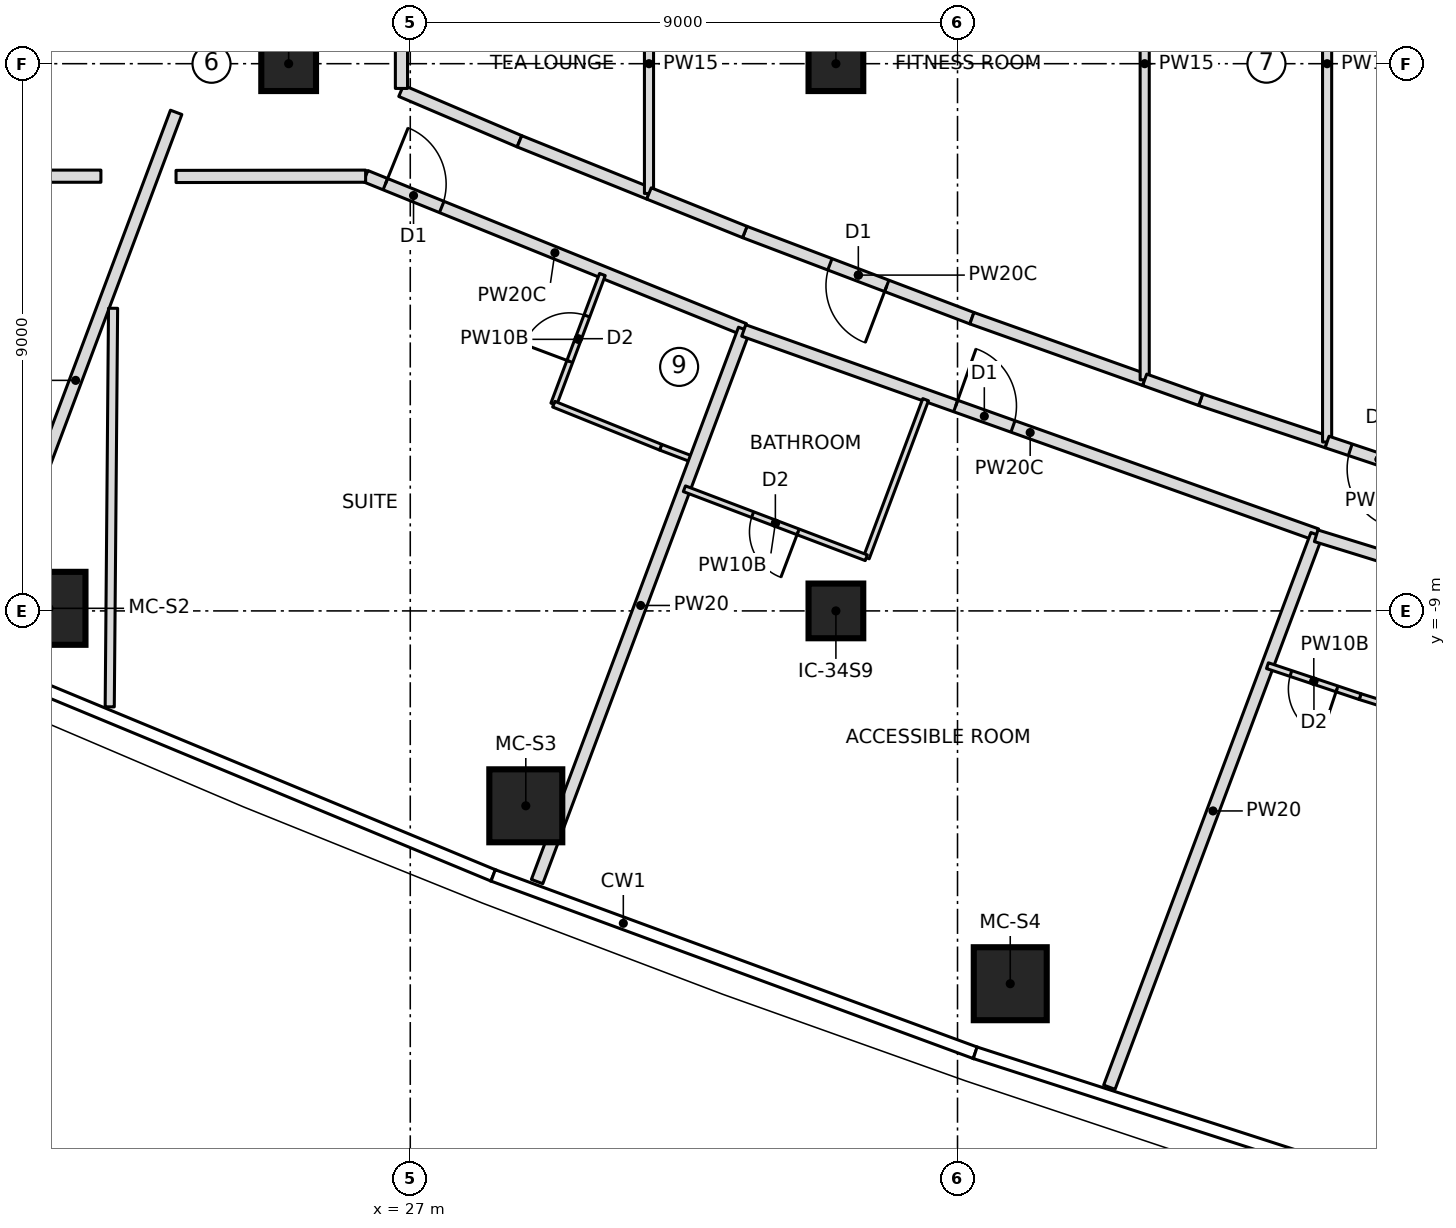
"""IFC4 building model, lengths in metres.
Left out: names, types, materials, properties, quantities, classifications, styles, units other than length and angle.
Written with IfcOpenShell. Run it as: python <this file> out.ifc"""

import sys

from ifc_helpers import new_model, si_unit, direction, frame, frame_2d, origin, origin_2d, place, context, subcontext, project, spatial, rectangle, extrude, element, fill, save


model = new_model("IFC4")
c1 = context("Model", 3, precision=1e-05, world=origin(), true_north=direction((0.0, 1.0)))
c2 = subcontext(c1, "Body", "Model", "MODEL_VIEW")
j1 = project(units=[si_unit("LENGTHUNIT", "METRE"), si_unit("PLANEANGLEUNIT", "RADIAN")], contexts=[c1])
p1 = place(None, origin())
s1 = spatial("IfcSite", under=j1, at=p1, CompositionType="ELEMENT")
p2 = place(p1, origin())
s2 = spatial("IfcBuilding", under=s1, at=p2, CompositionType="ELEMENT")
p3 = place(p2, frame((0.0, 0.0, 231.45)))
s3 = spatial("IfcBuildingStorey", under=s2, at=p3, CompositionType="ELEMENT", Elevation=231.45)
for number, where, z_axis, x_axis in (
    (1, (21.059, -8.958, 0.0), (0.0, 0.0, 1.0), (1.0, 0.0, 0.0)),
    (2, (28.9, -12.205, 0.0), (0.0, 0.0, 1.0), (1.0, 0.0, 0.0)),
    (3, (36.867, -15.132, 0.0), (0.0, 0.0, 1.0), (1.0, 0.0, 0.0)),
):
    element("IfcColumn", number, at=place(p3, frame(where, z_axis=z_axis, x_axis=x_axis)), inside=s3, PredefinedType="COLUMN", context=c2, shape_type="SweptSolid", body=[
        extrude(rectangle(XDim=1.2, YDim=1.2, at=origin_2d()), origin(), (0.0, 0.0, 1.0), 3.55),
    ])
for number, where, z_axis, x_axis in (
    (4, (25.0, 0.0, 0.0), (0.0, 0.0, 1.0), (1.0, 0.0, 0.0)),
    (5, (34.0, -9.0, 0.0), (0.0, 0.0, 1.0), (1.0, 0.0, 0.0)),
    (6, (34.0, 0.0, 0.0), (0.0, 0.0, 1.0), (1.0, 0.0, 0.0)),
):
    element("IfcColumn", number, at=place(p3, frame(where, z_axis=z_axis, x_axis=x_axis)), inside=s3, PredefinedType="COLUMN", context=c2, shape_type="SweptSolid", body=[
        extrude(rectangle(XDim=0.9, YDim=0.9, at=origin_2d()), origin(), (0.0, 0.0, 1.0), 3.55),
    ])
p4 = place(p3, frame((13.052, -1.85, 0.0), z_axis=(0.0, 0.0, 1.0), x_axis=(1.0, 0.0, 0.0)))
e7 = element("IfcWall", 7, at=p4, inside=s3, PredefinedType="PARTITIONING", context=c2, shape_type="SweptSolid", body=[
    extrude(rectangle(XDim=8.861, YDim=0.2, at=frame_2d((4.43, 0.0))), origin(), (0.0, 0.0, 1.0), 3.25),
])
p5 = place(p4, frame((3.93, 0.0, 0.0)))
e8 = element("IfcOpeningElement", 8, at=p5, cuts=e7, PredefinedType="OPENING", context=c2, shape_type="SweptSolid", body=[
    extrude(rectangle(XDim=1.0, YDim=2.1, at=frame_2d((0.5, 1.05))), frame((0.0, 0.11, 0.0), z_axis=(0.0, -1.0, 0.0), x_axis=(1.0, 0.0, 0.0)), (0.0, 0.0, 1.0), 0.22),
])
p6 = place(p3, frame((19.844, -9.616, 0.0), z_axis=(0.0, 0.0, 1.0), x_axis=(0.351123441588, 0.936329177569, 0.0)))
e9 = element("IfcWall", 9, at=p6, inside=s3, PredefinedType="PARTITIONING", context=c2, shape_type="SweptSolid", body=[
    extrude(rectangle(XDim=9.416, YDim=0.2, at=frame_2d((4.708, 0.0))), origin(), (0.0, 0.0, 1.0), 3.25),
])
p7 = place(p3, frame((26.266, -1.85, 0.0), z_axis=(0.0, 0.0, 1.0), x_axis=(0.927007906702, -0.375041785555, 0.0)))
e10 = element("IfcWall", 10, at=p7, inside=s3, PredefinedType="PARTITIONING", context=c2, shape_type="SweptSolid", body=[
    extrude(rectangle(XDim=6.716, YDim=0.2, at=frame_2d((3.358, 0.0))), origin(), (0.0, 0.0, 1.0), 3.25),
])
p8 = place(p7, frame((0.35, 0.0, 0.0)))
e11 = element("IfcOpeningElement", 11, at=p8, cuts=e10, PredefinedType="OPENING", context=c2, shape_type="SweptSolid", body=[
    extrude(rectangle(XDim=1.0, YDim=2.1, at=frame_2d((0.5, 1.05))), frame((0.0, 0.11, 0.0), z_axis=(0.0, -1.0, 0.0), x_axis=(1.0, 0.0, 0.0)), (0.0, 0.0, 1.0), 0.22),
])
p9 = place(p3, frame((29.36, -5.6, 0.0), z_axis=(0.0, 0.0, 1.0), x_axis=(0.351158682313, 0.936315961541, 0.0)))
e12 = element("IfcWall", 12, at=p9, inside=s3, PredefinedType="PARTITIONING", context=c2, shape_type="SweptSolid", body=[
    extrude(rectangle(XDim=2.278, YDim=0.1, at=frame_2d((1.139, 0.0))), origin(), (0.0, 0.0, 1.0), 3.25),
])
p10 = place(p9, frame((0.75, 0.0, 0.0)))
e13 = element("IfcOpeningElement", 13, at=p10, cuts=e12, PredefinedType="OPENING", context=c2, shape_type="SweptSolid", body=[
    extrude(rectangle(XDim=0.8, YDim=2.1, at=frame_2d((0.4, 1.05))), frame((0.0, 0.06, 0.0), z_axis=(0.0, -1.0, 0.0), x_axis=(1.0, 0.0, 0.0)), (0.0, 0.0, 1.0), 0.12),
])
p11 = place(p3, frame((31.684, -6.522, 0.0), z_axis=(0.0, 0.0, 1.0), x_axis=(-0.935048188903, 0.354520640342, 0.0)))
e14 = element("IfcWall", 14, at=p11, inside=s3, PredefinedType="PARTITIONING", context=c2, shape_type="SweptSolid", body=[
    extrude(rectangle(XDim=0.606, YDim=0.1, at=frame_2d((0.303, 0.0))), origin(), (0.0, 0.0, 1.0), 3.25),
])
p12 = place(p3, frame((31.117, -6.308, 0.0), z_axis=(0.0, 0.0, 1.0), x_axis=(-0.927594225674, 0.373589283166, 0.0)))
e15 = element("IfcWall", 15, at=p12, inside=s3, PredefinedType="PARTITIONING", context=c2, shape_type="SweptSolid", body=[
    extrude(rectangle(XDim=1.895, YDim=0.1, at=frame_2d((0.947, 0.0))), origin(), (0.0, 0.0, 1.0), 3.25),
])
p13 = place(p3, frame((29.086, -13.451, 0.0), z_axis=(0.0, 0.0, 1.0), x_axis=(0.351128958016, 0.93632710889, 0.0)))
e16 = element("IfcWall", 16, at=p13, inside=s3, PredefinedType="PARTITIONING", context=c2, shape_type="SweptSolid", body=[
    extrude(rectangle(XDim=9.7, YDim=0.2, at=frame_2d((4.85, 0.0))), origin(), (0.0, 0.0, 1.0), 3.25),
])
p14 = place(p3, frame((32.485, -4.388, 0.0), z_axis=(0.0, 0.0, 1.0), x_axis=(0.941953797829, -0.335742524498, 0.0)))
e17 = element("IfcWall", 17, at=p14, inside=s3, PredefinedType="PARTITIONING", context=c2, shape_type="SweptSolid", body=[
    extrude(rectangle(XDim=10.001, YDim=0.2, at=frame_2d((5.001, 0.0))), origin(), (0.0, 0.0, 1.0), 3.25),
])
p15 = place(p14, frame((3.7, 0.0, 0.0)))
e18 = element("IfcOpeningElement", 18, at=p15, cuts=e17, PredefinedType="OPENING", context=c2, shape_type="SweptSolid", body=[
    extrude(rectangle(XDim=1.0, YDim=2.1, at=frame_2d((0.5, 1.05))), frame((0.0, 0.11, 0.0), z_axis=(0.0, -1.0, 0.0), x_axis=(1.0, 0.0, 0.0)), (0.0, 0.0, 1.0), 0.22),
])
p16 = place(p3, frame((35.475, -5.526, 0.0), z_axis=(0.0, 0.0, 1.0), x_axis=(-0.351065630332, -0.936350854755, 0.0)))
e19 = element("IfcWall", 19, at=p16, inside=s3, PredefinedType="PARTITIONING", context=c2, shape_type="SweptSolid", body=[
    extrude(rectangle(XDim=2.777, YDim=0.1, at=frame_2d((1.388, 0.0))), origin(), (0.0, 0.0, 1.0), 3.25),
])
p17 = place(p3, frame((34.5, -8.126, 0.0), z_axis=(0.0, 0.0, 1.0), x_axis=(-0.934948661714, 0.354783032232, 0.0)))
e20 = element("IfcWall", 20, at=p17, inside=s3, PredefinedType="PARTITIONING", context=c2, shape_type="SweptSolid", body=[
    extrude(rectangle(XDim=3.2, YDim=0.1, at=frame_2d((1.6, 0.0))), origin(), (0.0, 0.0, 1.0), 3.25),
])
p18 = place(p17, frame((1.2, 0.0, 0.0)))
e21 = element("IfcOpeningElement", 21, at=p18, cuts=e20, PredefinedType="OPENING", context=c2, shape_type="SweptSolid", body=[
    extrude(rectangle(XDim=0.8, YDim=2.1, at=frame_2d((0.4, 1.05))), frame((0.0, 0.06, 0.0), z_axis=(0.0, -1.0, 0.0), x_axis=(1.0, 0.0, 0.0)), (0.0, 0.0, 1.0), 0.12),
])
p19 = place(p3, frame((38.497, -16.834, 0.0), z_axis=(0.0, 0.0, 1.0), x_axis=(0.35112895446, 0.936327110224, 0.0)))
e22 = element("IfcWall", 22, at=p19, inside=s3, PredefinedType="PARTITIONING", context=c2, shape_type="SweptSolid", body=[
    extrude(rectangle(XDim=9.706, YDim=0.2, at=frame_2d((4.853, 0.0))), origin(), (0.0, 0.0, 1.0), 3.25),
])
p20 = place(p3, frame((43.128, -10.568, 0.0), z_axis=(0.0, 0.0, 1.0), x_axis=(-0.954618903587, 0.297830067176, 0.0)))
e23 = element("IfcWall", 23, at=p20, inside=s3, PredefinedType="PARTITIONING", context=c2, shape_type="SweptSolid", body=[
    extrude(rectangle(XDim=0.531, YDim=0.1, at=frame_2d((0.266, 0.0))), origin(), (0.0, 0.0, 1.0), 3.25),
])
p21 = place(p3, frame((42.621, -10.409, 0.0), z_axis=(0.0, 0.0, 1.0), x_axis=(-0.948485479965, 0.3168206027, 0.0)))
e24 = element("IfcWall", 24, at=p21, inside=s3, PredefinedType="PARTITIONING", context=c2, shape_type="SweptSolid", body=[
    extrude(rectangle(XDim=1.606, YDim=0.1, at=frame_2d((0.803, 0.0))), origin(), (0.0, 0.0, 1.0), 3.25),
])
p22 = place(p21, frame((0.4, 0.0, 0.0)))
e25 = element("IfcOpeningElement", 25, at=p22, cuts=e24, PredefinedType="OPENING", context=c2, shape_type="SweptSolid", body=[
    extrude(rectangle(XDim=0.8, YDim=2.1, at=frame_2d((0.4, 1.05))), frame((0.0, 0.06, 0.0), z_axis=(0.0, -1.0, 0.0), x_axis=(1.0, 0.0, 0.0)), (0.0, 0.0, 1.0), 0.12),
])
p23 = place(p3, frame((28.796, -1.276, 0.0), z_axis=(0.0, 0.0, 1.0), x_axis=(-0.91990756443, 0.392135273732, 0.0)))
e26 = element("IfcWall", 26, at=p23, inside=s3, PredefinedType="PARTITIONING", context=c2, shape_type="SweptSolid", body=[
    extrude(rectangle(XDim=2.115, YDim=0.2, at=frame_2d((1.058, 0.0))), origin(), (0.0, 0.0, 1.0), 3.25),
])
p24 = place(p3, frame((30.926, -2.134, 0.0), z_axis=(0.0, 0.0, 1.0), x_axis=(-0.927609077038, 0.373552406224, 0.0)))
e27 = element("IfcWall", 27, at=p24, inside=s3, PredefinedType="PARTITIONING", context=c2, shape_type="SweptSolid", body=[
    extrude(rectangle(XDim=2.297, YDim=0.2, at=frame_2d((1.148, 0.0))), origin(), (0.0, 0.0, 1.0), 3.25),
])
p25 = place(p3, frame((30.926, -2.134, 0.0), z_axis=(0.0, 0.0, 1.0), x_axis=(0.0, 1.0, 0.0)))
e28 = element("IfcWall", 28, at=p25, inside=s3, PredefinedType="PARTITIONING", context=c2, shape_type="SweptSolid", body=[
    extrude(rectangle(XDim=4.268, YDim=0.15, at=frame_2d((2.134, 0.0))), origin(), (0.0, 0.0, 1.0), 3.25),
])
p26 = place(p3, frame((36.236, -4.186, 0.0), z_axis=(0.0, 0.0, 1.0), x_axis=(-0.934950696546, 0.354777669856, 0.0)))
e29 = element("IfcWall", 29, at=p26, inside=s3, PredefinedType="PARTITIONING", context=c2, shape_type="SweptSolid", body=[
    extrude(rectangle(XDim=3.995, YDim=0.2, at=frame_2d((1.997, 0.0))), origin(), (0.0, 0.0, 1.0), 3.25),
])
p27 = place(p26, frame((1.498, 0.0, 0.0)))
e30 = element("IfcOpeningElement", 30, at=p27, cuts=e29, PredefinedType="OPENING", context=c2, shape_type="SweptSolid", body=[
    extrude(rectangle(XDim=1.0, YDim=2.1, at=frame_2d((0.5, 1.05))), frame((0.0, 0.11, 0.0), z_axis=(0.0, -1.0, 0.0), x_axis=(1.0, 0.0, 0.0)), (0.0, 0.0, 1.0), 0.22),
])
p28 = place(p3, frame((39.078, -5.199, 0.0), z_axis=(0.0, 0.0, 1.0), x_axis=(-0.941908381697, 0.335869916023, 0.0)))
e31 = element("IfcWall", 31, at=p28, inside=s3, PredefinedType="PARTITIONING", context=c2, shape_type="SweptSolid", body=[
    extrude(rectangle(XDim=3.017, YDim=0.2, at=frame_2d((1.509, 0.0))), origin(), (0.0, 0.0, 1.0), 3.25),
])
p29 = place(p3, frame((32.501, -2.768, 0.0), z_axis=(0.0, 0.0, 1.0), x_axis=(-0.927641577565, 0.373471690456, 0.0)))
e32 = element("IfcWall", 32, at=p29, inside=s3, PredefinedType="PARTITIONING", context=c2, shape_type="SweptSolid", body=[
    extrude(rectangle(XDim=1.698, YDim=0.2, at=frame_2d((0.849, 0.0))), origin(), (0.0, 0.0, 1.0), 3.25),
])
p30 = place(p3, frame((39.078, -5.199, 0.0), z_axis=(0.0, 0.0, 1.0), x_axis=(0.0, 1.0, 0.0)))
e33 = element("IfcWall", 33, at=p30, inside=s3, PredefinedType="PARTITIONING", context=c2, shape_type="SweptSolid", body=[
    extrude(rectangle(XDim=10.398, YDim=0.15, at=frame_2d((5.199, 0.0))), origin(), (0.0, 0.0, 1.0), 3.25),
])
p31 = place(p3, frame((42.078, -6.222, 0.0), z_axis=(0.0, 0.0, 1.0), x_axis=(-0.9484714727, 0.316862534034, 0.0)))
e34 = element("IfcWall", 34, at=p31, inside=s3, PredefinedType="PARTITIONING", context=c2, shape_type="SweptSolid", body=[
    extrude(rectangle(XDim=2.192, YDim=0.2, at=frame_2d((1.096, 0.0))), origin(), (0.0, 0.0, 1.0), 3.25),
])
p32 = place(p3, frame((39.999, -5.527, 0.0), z_axis=(0.0, 0.0, 1.0), x_axis=(-0.941911279377, 0.335861789704, 0.0)))
e35 = element("IfcWall", 35, at=p32, inside=s3, PredefinedType="PARTITIONING", context=c2, shape_type="SweptSolid", body=[
    extrude(rectangle(XDim=0.978, YDim=0.2, at=frame_2d((0.489, 0.0))), origin(), (0.0, 0.0, 1.0), 3.25),
])
p33 = place(p3, frame((42.078, -6.222, 0.0), z_axis=(0.0, 0.0, 1.0), x_axis=(0.0, 1.0, 0.0)))
e36 = element("IfcWall", 36, at=p33, inside=s3, PredefinedType="PARTITIONING", context=c2, shape_type="SweptSolid", body=[
    extrude(rectangle(XDim=12.444, YDim=0.15, at=frame_2d((6.222, 0.0))), origin(), (0.0, 0.0, 1.0), 3.25),
])
p34 = place(p3, frame((43.788, -6.793, 0.0), z_axis=(0.0, 0.0, 1.0), x_axis=(-0.948466406859, 0.316877697323, 0.0)))
e37 = element("IfcWall", 37, at=p34, inside=s3, PredefinedType="PARTITIONING", context=c2, shape_type="SweptSolid", body=[
    extrude(rectangle(XDim=1.803, YDim=0.2, at=frame_2d((0.901, 0.0))), origin(), (0.0, 0.0, 1.0), 3.25),
])
p35 = place(p34, frame((0.402, 0.0, 0.0)))
e38 = element("IfcOpeningElement", 38, at=p35, cuts=e37, PredefinedType="OPENING", context=c2, shape_type="SweptSolid", body=[
    extrude(rectangle(XDim=1.0, YDim=2.1, at=frame_2d((0.5, 1.05))), frame((0.0, 0.11, 0.0), z_axis=(0.0, -1.0, 0.0), x_axis=(1.0, 0.0, 0.0)), (0.0, 0.0, 1.0), 0.22),
])
p36 = place(p3, frame((22.112, -4.023, 0.0), z_axis=(0.0, 0.0, 1.0), x_axis=(-0.008379594055, -0.999964890585, 0.0)))
e39 = element("IfcWall", 39, at=p36, inside=s3, PredefinedType="PARTITIONING", context=c2, shape_type="SweptSolid", body=[
    extrude(rectangle(XDim=6.555, YDim=0.15, at=frame_2d((3.278, 0.0))), origin(), (0.0, 0.0, 1.0), 3.25),
])
p37 = place(p3, frame((41.898, -7.764, 0.0), z_axis=(0.0, 0.0, 1.0), x_axis=(0.955502033518, -0.294984514752, 0.0)))
e40 = element("IfcWall", 40, at=p37, inside=s3, PredefinedType="PARTITIONING", context=c2, shape_type="SweptSolid", body=[
    extrude(rectangle(XDim=6.7, YDim=0.2, at=frame_2d((3.35, 0.0))), origin(), (0.0, 0.0, 1.0), 3.25),
])
p38 = place(p37, frame((3.95, 0.0, 0.0)))
e41 = element("IfcOpeningElement", 41, at=p38, cuts=e40, PredefinedType="OPENING", context=c2, shape_type="SweptSolid", body=[
    extrude(rectangle(XDim=1.5, YDim=2.1, at=frame_2d((0.75, 1.05))), frame((0.0, 0.11, 0.0), z_axis=(0.0, -1.0, 0.0), x_axis=(1.0, 0.0, 0.0)), (0.0, 0.0, 1.0), 0.22),
])
p39 = place(p3, frame((26.855, -0.407, 0.0), z_axis=(0.0, 0.0, 1.0), x_axis=(0.0, 1.0, 0.0)))
e42 = element("IfcWall", 42, at=p39, inside=s3, PredefinedType="PARTITIONING", context=c2, shape_type="SweptSolid", body=[
    extrude(rectangle(XDim=0.814, YDim=0.2, at=frame_2d((0.407, 0.0))), origin(), (0.0, 0.0, 1.0), 3.25),
])
p40 = place(p3, frame((23.148, -1.854, 0.0), z_axis=(0.0, 0.0, 1.0), x_axis=(0.999999006581, 0.001409552241, 0.0)))
e43 = element("IfcWall", 43, at=p40, inside=s3, PredefinedType="PARTITIONING", context=c2, shape_type="SweptSolid", body=[
    extrude(rectangle(XDim=3.118, YDim=0.2, at=frame_2d((1.559, 0.0))), origin(), (0.0, 0.0, 1.0), 3.25),
])
p41 = place(p10, origin())
e44 = element("IfcDoor", 44, at=p41, inside=s3, OperationType="SINGLE_SWING_LEFT", PredefinedType="DOOR", context=c2, shape_type="SweptSolid", body=[
    extrude(rectangle(XDim=0.8, YDim=2.1, at=frame_2d((0.4, 1.05))), frame((0.0, 0.025, 0.0), z_axis=(0.0, -1.0, 0.0), x_axis=(1.0, 0.0, 0.0)), (0.0, 0.0, 1.0), 0.05),
])
fill(e13, e44)
p42 = place(p8, origin())
e45 = element("IfcDoor", 45, at=p42, inside=s3, OperationType="SINGLE_SWING_LEFT", PredefinedType="DOOR", context=c2, shape_type="SweptSolid", body=[
    extrude(rectangle(XDim=1.0, YDim=2.1, at=frame_2d((0.5, 1.05))), frame((0.0, 0.025, 0.0), z_axis=(0.0, -1.0, 0.0), x_axis=(1.0, 0.0, 0.0)), (0.0, 0.0, 1.0), 0.05),
])
fill(e11, e45)
p43 = place(p18, origin())
e46 = element("IfcDoor", 46, at=p43, inside=s3, OperationType="SINGLE_SWING_LEFT", PredefinedType="DOOR", context=c2, shape_type="SweptSolid", body=[
    extrude(rectangle(XDim=0.8, YDim=2.1, at=frame_2d((0.4, 1.05))), frame((0.0, 0.025, 0.0), z_axis=(0.0, -1.0, 0.0), x_axis=(1.0, 0.0, 0.0)), (0.0, 0.0, 1.0), 0.05),
])
fill(e21, e46)
p44 = place(p15, origin())
e47 = element("IfcDoor", 47, at=p44, inside=s3, OperationType="SINGLE_SWING_LEFT", PredefinedType="DOOR", context=c2, shape_type="SweptSolid", body=[
    extrude(rectangle(XDim=1.0, YDim=2.1, at=frame_2d((0.5, 1.05))), frame((0.0, 0.025, 0.0), z_axis=(0.0, -1.0, 0.0), x_axis=(1.0, 0.0, 0.0)), (0.0, 0.0, 1.0), 0.05),
])
fill(e18, e47)
p45 = place(p22, origin())
e48 = element("IfcDoor", 48, at=p45, inside=s3, OperationType="SINGLE_SWING_LEFT", PredefinedType="DOOR", context=c2, shape_type="SweptSolid", body=[
    extrude(rectangle(XDim=0.8, YDim=2.1, at=frame_2d((0.4, 1.05))), frame((0.0, 0.025, 0.0), z_axis=(0.0, -1.0, 0.0), x_axis=(1.0, 0.0, 0.0)), (0.0, 0.0, 1.0), 0.05),
])
fill(e25, e48)
p46 = place(p27, origin())
e49 = element("IfcDoor", 49, at=p46, inside=s3, OperationType="SINGLE_SWING_LEFT", PredefinedType="DOOR", context=c2, shape_type="SweptSolid", body=[
    extrude(rectangle(XDim=1.0, YDim=2.1, at=frame_2d((0.5, 1.05))), frame((0.0, 0.025, 0.0), z_axis=(0.0, -1.0, 0.0), x_axis=(1.0, 0.0, 0.0)), (0.0, 0.0, 1.0), 0.05),
])
fill(e30, e49)
p47 = place(p35, origin())
e50 = element("IfcDoor", 50, at=p47, inside=s3, OperationType="SINGLE_SWING_LEFT", PredefinedType="DOOR", context=c2, shape_type="SweptSolid", body=[
    extrude(rectangle(XDim=1.0, YDim=2.1, at=frame_2d((0.5, 1.05))), frame((0.0, 0.025, 0.0), z_axis=(0.0, -1.0, 0.0), x_axis=(1.0, 0.0, 0.0)), (0.0, 0.0, 1.0), 0.05),
])
fill(e38, e50)
save(model, sys.argv[1])
